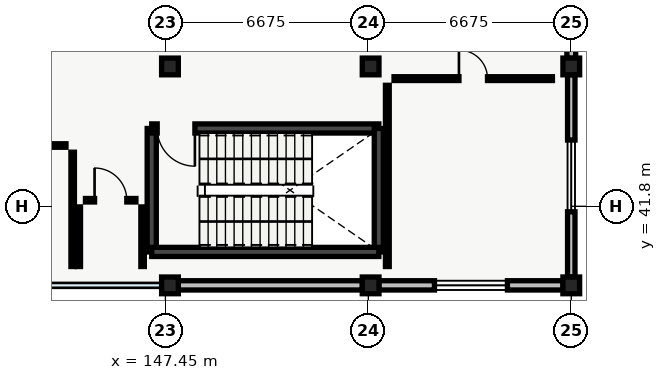
"""IFC4 building model, lengths in metres.
Left out: names, types, materials, properties, quantities, classifications, styles, units other than length and angle.
Written with IfcOpenShell. Run it as: python <this file> out.ifc"""

import sys

from ifc_helpers import new_model, si_unit, direction, frame, frame_2d, origin, origin_2d, place, context, subcontext, project, spatial, rectangle, extrude, element, fill, save


model = new_model("IFC4")
c1 = context("Model", 3, precision=1e-05, world=origin(), true_north=direction((0.0, 1.0)))
c2 = subcontext(c1, "Body", "Model", "MODEL_VIEW")
j1 = project(units=[si_unit("LENGTHUNIT", "METRE"), si_unit("PLANEANGLEUNIT", "RADIAN")], contexts=[c1])
p1 = place(None, origin())
s1 = spatial("IfcSite", under=j1, at=p1, CompositionType="ELEMENT")
p2 = place(p1, origin())
s2 = spatial("IfcBuilding", under=s1, at=p2, CompositionType="ELEMENT")
p3 = place(p2, frame((0.0, 0.0, 23.1)))
s3 = spatial("IfcBuildingStorey", under=s2, at=p3, CompositionType="ELEMENT", Elevation=23.1)
for number, where, z_axis, x_axis in (
    (1, (147.6, 39.2, 0.0), (0.0, 0.0, 1.0), (1.0, 0.0, 0.0)),
    (2, (147.6, 46.4, 0.0), (0.0, 0.0, 1.0), (1.0, 0.0, 0.0)),
    (3, (154.2, 39.2, 0.0), (0.0, 0.0, 1.0), (1.0, 0.0, 0.0)),
    (4, (154.2, 46.4, 0.0), (0.0, 0.0, 1.0), (1.0, 0.0, 0.0)),
    (5, (160.8, 39.2, 0.0), (0.0, 0.0, 1.0), (1.0, 0.0, 0.0)),
    (6, (160.8, 46.4, 0.0), (0.0, 0.0, 1.0), (1.0, 0.0, 0.0)),
):
    element("IfcColumn", number, at=place(p3, frame(where, z_axis=z_axis, x_axis=x_axis)), inside=s3, PredefinedType="COLUMN", context=c2, shape_type="SweptSolid", body=[
        extrude(rectangle(XDim=0.55, YDim=0.55, at=origin_2d()), origin(), (0.0, 0.0, 1.0), 4.29),
    ])
p4 = place(p3, frame((160.8, 53.33, 0.0), z_axis=(0.0, 0.0, 1.0), x_axis=(0.0, -1.0, 0.0)))
e7 = element("IfcWall", 7, at=p4, inside=s3, PredefinedType="STANDARD", context=c2, shape_type="SweptSolid", body=[
    extrude(rectangle(XDim=6.66, YDim=0.29, at=frame_2d((3.33, 0.0))), origin(), (0.0, 0.0, 1.0), 3.775),
])
p5 = place(p4, frame((2.105, 0.0, 0.95)))
e8 = element("IfcOpeningElement", 8, at=p5, cuts=e7, PredefinedType="OPENING", context=c2, shape_type="SweptSolid", body=[
    extrude(rectangle(XDim=2.45, YDim=1.38, at=frame_2d((1.225, 0.69))), frame((0.0, 0.145, 0.0), z_axis=(0.0, -1.0, 0.0), x_axis=(1.0, 0.0, 0.0)), (0.0, 0.0, 1.0), 0.29),
])
p6 = place(p3, frame((160.8, 46.13, 0.0), z_axis=(0.0, 0.0, 1.0), x_axis=(0.0, -1.0, 0.0)))
e9 = element("IfcWall", 9, at=p6, inside=s3, PredefinedType="STANDARD", context=c2, shape_type="SweptSolid", body=[
    extrude(rectangle(XDim=6.66, YDim=0.245, at=frame_2d((3.33, 0.0))), origin(), (0.0, 0.0, 1.0), 3.775),
])
p7 = place(p6, frame((2.15, 0.0, 0.95)))
e10 = element("IfcOpeningElement", 10, at=p7, cuts=e9, PredefinedType="OPENING", context=c2, shape_type="SweptSolid", body=[
    extrude(rectangle(XDim=2.36, YDim=1.36, at=frame_2d((1.18, 0.68))), frame((0.0, 0.123, 0.0), z_axis=(0.0, -1.0, 0.0), x_axis=(1.0, 0.0, 0.0)), (0.0, 0.0, 1.0), 0.245),
])
p8 = place(p3, frame((160.53, 39.2, 0.0), z_axis=(0.0, 0.0, 1.0), x_axis=(-1.0, 0.0, 0.0)))
e11 = element("IfcWall", 11, at=p8, inside=s3, PredefinedType="STANDARD", context=c2, shape_type="SweptSolid", body=[
    extrude(rectangle(XDim=6.06, YDim=0.305, at=frame_2d((3.03, 0.0))), origin(), (0.0, 0.0, 1.0), 3.775),
])
p9 = place(p8, frame((1.83, 0.0, 0.95)))
e12 = element("IfcOpeningElement", 12, at=p9, cuts=e11, PredefinedType="OPENING", context=c2, shape_type="SweptSolid", body=[
    extrude(rectangle(XDim=2.4, YDim=1.65, at=frame_2d((1.2, 0.825))), frame((0.0, 0.152, 0.0), z_axis=(0.0, -1.0, 0.0), x_axis=(1.0, 0.0, 0.0)), (0.0, 0.0, 1.0), 0.305),
])
p10 = place(p3, frame((153.93, 39.2, 0.0), z_axis=(0.0, 0.0, 1.0), x_axis=(-1.0, 0.0, 0.0)))
e13 = element("IfcWall", 13, at=p10, inside=s3, PredefinedType="STANDARD", context=c2, shape_type="SweptSolid", body=[
    extrude(rectangle(XDim=6.06, YDim=0.305, at=frame_2d((3.03, 0.0))), origin(), (0.0, 0.0, 1.0), 3.775),
])
p11 = place(p3, frame((147.0, 40.3, 0.0), z_axis=(0.0, 0.0, 1.0), x_axis=(0.0, 1.0, 0.0)))
e14 = element("IfcWall", 14, at=p11, inside=s3, PredefinedType="SHEAR", context=c2, shape_type="SweptSolid", body=[
    extrude(rectangle(XDim=4.06, YDim=0.3, at=frame_2d((2.03, 0.0))), origin(), (0.0, 0.0, 1.0), 4.28),
])
p12 = place(p3, frame((147.0, 44.36, 0.0), z_axis=(0.0, 0.0, 1.0), x_axis=(1.0, 0.0, 0.0)))
e15 = element("IfcWall", 15, at=p12, inside=s3, PredefinedType="SHEAR", context=c2, shape_type="SweptSolid", body=[
    extrude(rectangle(XDim=7.47, YDim=0.3, at=frame_2d((3.735, 0.0))), origin(), (0.0, 0.0, 1.0), 4.28),
])
p13 = place(p12, frame((0.18, 0.0, 0.0)))
e16 = element("IfcOpeningElement", 16, at=p13, cuts=e15, PredefinedType="OPENING", context=c2, shape_type="SweptSolid", body=[
    extrude(rectangle(XDim=1.24, YDim=2.15, at=frame_2d((0.62, 1.075))), frame((0.0, 0.15, 0.0), z_axis=(0.0, -1.0, 0.0), x_axis=(1.0, 0.0, 0.0)), (0.0, 0.0, 1.0), 0.3),
])
p14 = place(p3, frame((154.47, 44.36, 0.0), z_axis=(0.0, 0.0, 1.0), x_axis=(0.0, -1.0, 0.0)))
e17 = element("IfcWall", 17, at=p14, inside=s3, PredefinedType="SHEAR", context=c2, shape_type="SweptSolid", body=[
    extrude(rectangle(XDim=4.06, YDim=0.3, at=frame_2d((2.03, 0.0))), origin(), (0.0, 0.0, 1.0), 4.28),
])
p15 = place(p3, frame((154.47, 40.3, 0.0), z_axis=(0.0, 0.0, 1.0), x_axis=(-1.0, 0.0, 0.0)))
e18 = element("IfcWall", 18, at=p15, inside=s3, PredefinedType="SHEAR", context=c2, shape_type="SweptSolid", body=[
    extrude(rectangle(XDim=7.47, YDim=0.3, at=frame_2d((3.735, 0.0))), origin(), (0.0, 0.0, 1.0), 4.28),
])
p16 = place(p3, frame((144.4, 39.82, 0.0), z_axis=(0.0, 0.0, 1.0), x_axis=(0.0, 1.0, 0.0)))
e19 = element("IfcWall", 19, at=p16, inside=s3, PredefinedType="PARTITIONING", context=c2, shape_type="SweptSolid", body=[
    extrude(rectangle(XDim=3.76, YDim=0.115, at=frame_2d((1.88, 0.0))), origin(), (0.0, 0.0, 1.0), 3.95),
])
p17 = place(p3, frame((144.18, 43.8, 0.0), z_axis=(0.0, 0.0, 1.0), x_axis=(-1.0, 0.0, 0.0)))
e20 = element("IfcWall", 20, at=p17, inside=s3, PredefinedType="PARTITIONING", context=c2, shape_type="SweptSolid", body=[
    extrude(rectangle(XDim=2.56, YDim=0.115, at=frame_2d((1.28, 0.0))), origin(), (0.0, 0.0, 1.0), 3.95),
])
p18 = place(p17, frame((0.83, 0.0, 0.0)))
e21 = element("IfcOpeningElement", 21, at=p18, cuts=e20, PredefinedType="OPENING", context=c2, shape_type="SweptSolid", body=[
    extrude(rectangle(XDim=0.9, YDim=2.1, at=frame_2d((0.45, 1.05))), frame((0.0, 0.058, 0.0), z_axis=(0.0, -1.0, 0.0), x_axis=(1.0, 0.0, 0.0)), (0.0, 0.0, 1.0), 0.115),
])
p19 = place(p3, frame((146.7, 39.82, 0.0), z_axis=(0.0, 0.0, 1.0), x_axis=(0.0, 1.0, 0.0)))
e22 = element("IfcWall", 22, at=p19, inside=s3, PredefinedType="PARTITIONING", context=c2, shape_type="SweptSolid", body=[
    extrude(rectangle(XDim=1.96, YDim=0.115, at=frame_2d((0.98, 0.0))), origin(), (0.0, 0.0, 1.0), 3.95),
])
p20 = place(p3, frame((146.48, 42.0, 0.0), z_axis=(0.0, 0.0, 1.0), x_axis=(-1.0, 0.0, 0.0)))
e23 = element("IfcWall", 23, at=p20, inside=s3, PredefinedType="PARTITIONING", context=c2, shape_type="SweptSolid", body=[
    extrude(rectangle(XDim=1.66, YDim=0.115, at=frame_2d((0.83, 0.0))), origin(), (0.0, 0.0, 1.0), 3.95),
])
p21 = place(p20, frame((0.3, 0.0, 0.0)))
e24 = element("IfcOpeningElement", 24, at=p21, cuts=e23, PredefinedType="OPENING", context=c2, shape_type="SweptSolid", body=[
    extrude(rectangle(XDim=1.06, YDim=2.12, at=frame_2d((0.53, 1.06))), frame((0.0, 0.058, 0.0), z_axis=(0.0, -1.0, 0.0), x_axis=(1.0, 0.0, 0.0)), (0.0, 0.0, 1.0), 0.115),
])
p22 = place(p3, frame((144.6, 41.78, 0.0), z_axis=(0.0, 0.0, 1.0), x_axis=(0.0, -1.0, 0.0)))
e25 = element("IfcWall", 25, at=p22, inside=s3, PredefinedType="PARTITIONING", context=c2, shape_type="SweptSolid", body=[
    extrude(rectangle(XDim=1.96, YDim=0.115, at=frame_2d((0.98, 0.0))), origin(), (0.0, 0.0, 1.0), 3.95),
])
p23 = place(p3, frame((160.18, 46.0, 0.0), z_axis=(0.0, 0.0, 1.0), x_axis=(-1.0, 0.0, 0.0)))
e26 = element("IfcWall", 26, at=p23, inside=s3, PredefinedType="PARTITIONING", context=c2, shape_type="SweptSolid", body=[
    extrude(rectangle(XDim=5.21, YDim=0.125, at=frame_2d((2.605, 0.0))), origin(), (0.0, 0.0, 1.0), 3.95),
])
p24 = place(p23, frame((2.135, 0.0, 0.0)))
e27 = element("IfcOpeningElement", 27, at=p24, cuts=e26, PredefinedType="OPENING", context=c2, shape_type="SweptSolid", body=[
    extrude(rectangle(XDim=0.94, YDim=2.12, at=frame_2d((0.47, 1.06))), frame((0.0, 0.062, 0.0), z_axis=(0.0, -1.0, 0.0), x_axis=(1.0, 0.0, 0.0)), (0.0, 0.0, 1.0), 0.125),
])
p25 = place(p3, frame((154.75, 45.78, 0.0), z_axis=(0.0, 0.0, 1.0), x_axis=(0.0, -1.0, 0.0)))
e28 = element("IfcWall", 28, at=p25, inside=s3, PredefinedType="PARTITIONING", context=c2, shape_type="SweptSolid", body=[
    extrude(rectangle(XDim=5.96, YDim=0.125, at=frame_2d((2.98, 0.0))), origin(), (0.0, 0.0, 1.0), 3.95),
])
p26 = place(p7, origin())
e29 = element("IfcWindow", 29, at=p26, inside=s3, PartitioningType="SINGLE_PANEL", PredefinedType="WINDOW", context=c2, shape_type="SweptSolid", body=[
    extrude(rectangle(XDim=2.36, YDim=1.36, at=frame_2d((1.18, 0.68))), frame((0.0, 0.03, 0.0), z_axis=(0.0, -1.0, 0.0), x_axis=(1.0, 0.0, 0.0)), (0.0, 0.0, 1.0), 0.06),
])
fill(e10, e29)
p27 = place(p9, origin())
e30 = element("IfcWindow", 30, at=p27, inside=s3, PartitioningType="SINGLE_PANEL", PredefinedType="WINDOW", context=c2, shape_type="SweptSolid", body=[
    extrude(rectangle(XDim=2.4, YDim=1.65, at=frame_2d((1.2, 0.825))), frame((0.0, 0.03, 0.0), z_axis=(0.0, -1.0, 0.0), x_axis=(1.0, 0.0, 0.0)), (0.0, 0.0, 1.0), 0.06),
])
fill(e12, e30)
p28 = place(p13, origin())
e31 = element("IfcDoor", 31, at=p28, inside=s3, OperationType="SINGLE_SWING_RIGHT", PredefinedType="DOOR", context=c2, shape_type="SweptSolid", body=[
    extrude(rectangle(XDim=1.24, YDim=2.15, at=frame_2d((0.62, 1.075))), frame((0.0, 0.025, 0.0), z_axis=(0.0, -1.0, 0.0), x_axis=(1.0, 0.0, 0.0)), (0.0, 0.0, 1.0), 0.05),
])
fill(e16, e31)
p29 = place(p21, origin())
e32 = element("IfcDoor", 32, at=p29, inside=s3, OperationType="SINGLE_SWING_RIGHT", PredefinedType="DOOR", context=c2, shape_type="SweptSolid", body=[
    extrude(rectangle(XDim=1.06, YDim=2.12, at=frame_2d((0.53, 1.06))), frame((0.0, 0.025, 0.0), z_axis=(0.0, -1.0, 0.0), x_axis=(1.0, 0.0, 0.0)), (0.0, 0.0, 1.0), 0.05),
])
fill(e24, e32)
p30 = place(p24, origin())
e33 = element("IfcDoor", 33, at=p30, inside=s3, OperationType="SINGLE_SWING_RIGHT", PredefinedType="DOOR", context=c2, shape_type="SweptSolid", body=[
    extrude(rectangle(XDim=0.94, YDim=2.12, at=frame_2d((0.47, 1.06))), frame((0.0, 0.025, 0.0), z_axis=(0.0, -1.0, 0.0), x_axis=(1.0, 0.0, 0.0)), (0.0, 0.0, 1.0), 0.05),
])
fill(e27, e33)
save(model, sys.argv[1])
